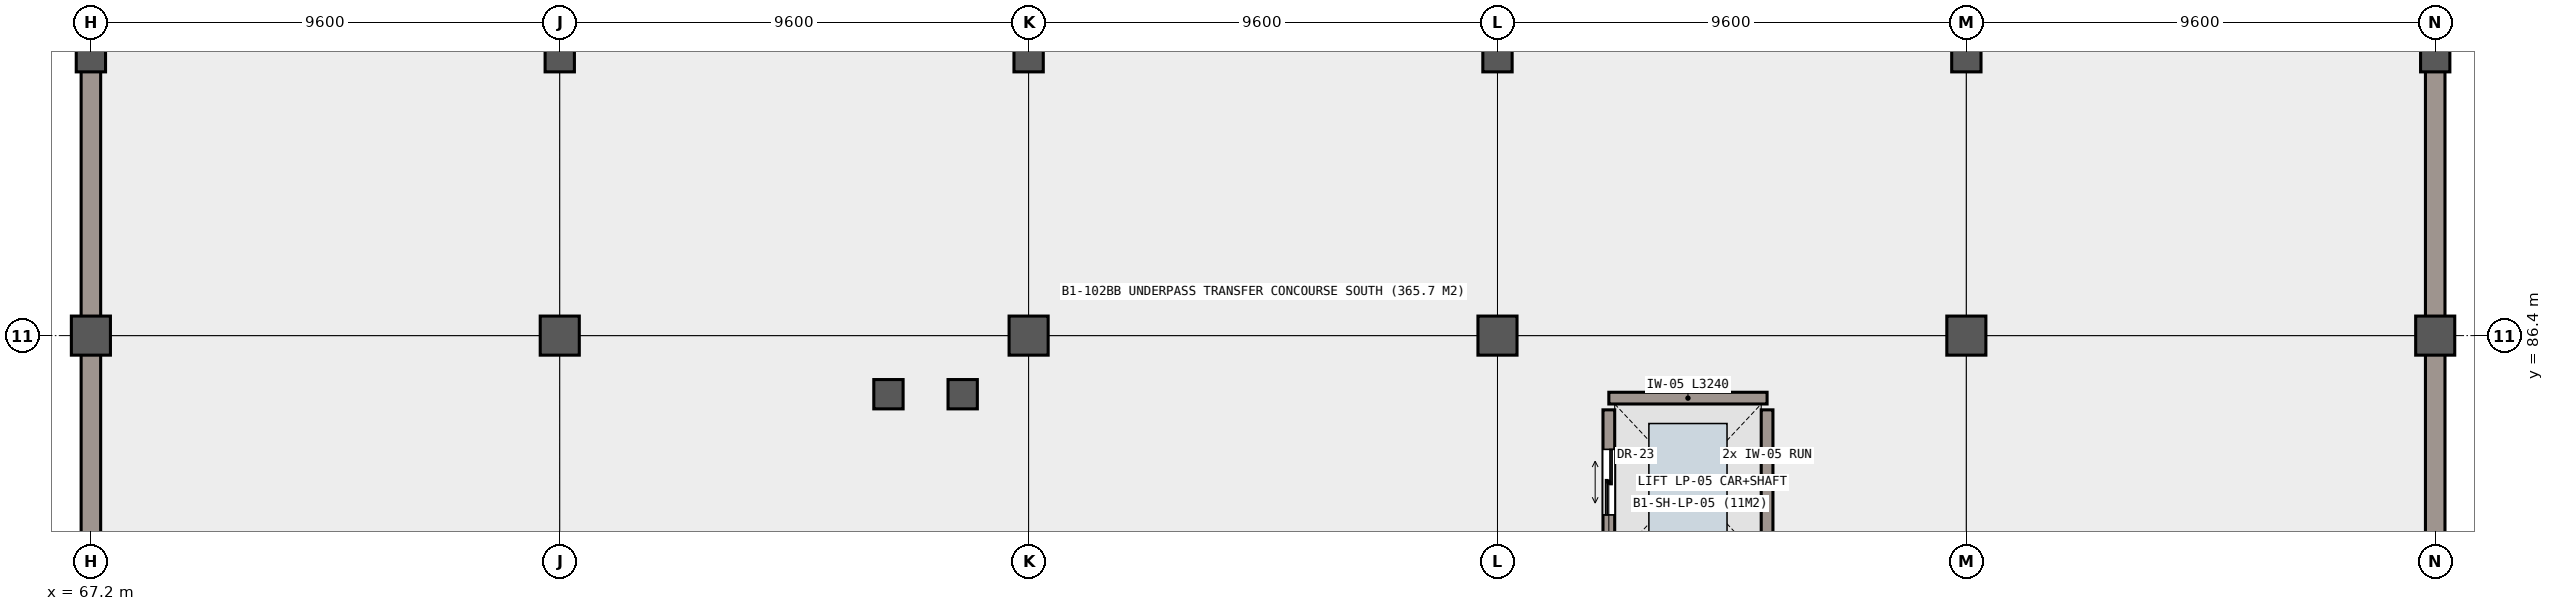
"""IFC4 building model, lengths in metres.
Left out: names, types, materials, properties, quantities, classifications, styles, units other than length and angle.
Written with IfcOpenShell. Run it as: python <this file> out.ifc"""

import sys

from ifc_helpers import new_model, si_unit, direction, frame, frame_2d, origin, origin_2d, place, context, subcontext, project, spatial, rectangle, extrude, element, fill, save


model = new_model("IFC4")
c1 = context("Model", 3, precision=1e-05, world=origin(), true_north=direction((0.0, 1.0)))
c2 = subcontext(c1, "Body", "Model", "MODEL_VIEW")
j1 = project(units=[si_unit("LENGTHUNIT", "METRE"), si_unit("PLANEANGLEUNIT", "RADIAN")], contexts=[c1])
p1 = place(None, origin())
s1 = spatial("IfcSite", under=j1, at=p1, CompositionType="ELEMENT")
p2 = place(p1, origin())
s2 = spatial("IfcBuilding", under=s1, at=p2, CompositionType="ELEMENT")
p3 = place(p2, frame((0.0, 0.0, -4.8)))
s3 = spatial("IfcBuildingStorey", under=s2, at=p3, CompositionType="ELEMENT", Elevation=-4.8)
for number, where, z_axis, x_axis in (
    (1, (67.2, 86.4, 0.0), (0.0, 0.0, 1.0), (1.0, 0.0, 0.0)),
    (2, (76.8, 86.4, 0.0), (0.0, 0.0, 1.0), (1.0, 0.0, 0.0)),
    (3, (86.4, 86.4, 0.0), (0.0, 0.0, 1.0), (1.0, 0.0, 0.0)),
    (4, (96.0, 86.4, 0.0), (0.0, 0.0, 1.0), (1.0, 0.0, 0.0)),
    (5, (105.6, 86.4, 0.0), (0.0, 0.0, 1.0), (1.0, 0.0, 0.0)),
    (6, (115.2, 86.4, 0.0), (0.0, 0.0, 1.0), (1.0, 0.0, 0.0)),
):
    element("IfcColumn", number, at=place(p3, frame(where, z_axis=z_axis, x_axis=x_axis)), inside=s3, PredefinedType="COLUMN", context=c2, shape_type="SweptSolid", body=[
        extrude(rectangle(XDim=0.8, YDim=0.8, at=origin_2d()), origin(), (0.0, 0.0, 1.0), 4.8),
    ])
for number, where, z_axis, x_axis in (
    (7, (67.2, 92.1, 0.0), (0.0, 0.0, 1.0), (1.0, 0.0, 0.0)),
    (8, (76.8, 92.1, 0.0), (0.0, 0.0, 1.0), (1.0, 0.0, 0.0)),
    (9, (86.4, 92.1, 0.0), (0.0, 0.0, 1.0), (1.0, 0.0, 0.0)),
    (10, (96.0, 92.1, 0.0), (0.0, 0.0, 1.0), (1.0, 0.0, 0.0)),
    (11, (105.6, 92.1, 0.0), (0.0, 0.0, 1.0), (1.0, 0.0, 0.0)),
    (12, (115.2, 92.1, 0.0), (0.0, 0.0, 1.0), (1.0, 0.0, 0.0)),
):
    element("IfcColumn", number, at=place(p3, frame(where, z_axis=z_axis, x_axis=x_axis)), inside=s3, PredefinedType="COLUMN", context=c2, shape_type="SweptSolid", body=[
        extrude(rectangle(XDim=0.6, YDim=0.6, at=origin_2d()), origin(), (0.0, 0.0, 1.0), 4.5),
    ])
for number, where, z_axis, x_axis in (
    (13, (83.53, 85.2, 0.0), (0.0, 0.0, 1.0), (1.0, 0.0, 0.0)),
    (14, (85.05, 85.2, 0.0), (0.0, 0.0, 1.0), (1.0, 0.0, 0.0)),
):
    element("IfcColumn", number, at=place(p3, frame(where, z_axis=z_axis, x_axis=x_axis)), inside=s3, PredefinedType="COLUMN", context=c2, shape_type="SweptSolid", body=[
        extrude(rectangle(XDim=0.6, YDim=0.6, at=origin_2d()), origin(), (0.0, 0.0, 1.0), 4.8),
    ])
for number, where, z_axis, x_axis in (
    (15, (67.2, 67.2, 0.0), (0.0, 0.0, 1.0), (0.0, 1.0, 0.0)),
    (16, (115.2, 124.8, 0.0), (0.0, 0.0, 1.0), (0.0, -1.0, 0.0)),
):
    element("IfcWall", number, at=place(p3, frame(where, z_axis=z_axis, x_axis=x_axis)), inside=s3, PredefinedType="USERDEFINED", context=c2, shape_type="SweptSolid", body=[
        extrude(rectangle(XDim=57.6, YDim=0.4, at=frame_2d((28.8, 0.0))), origin(), (0.0, 0.0, 1.0), 3.88),
    ])
p4 = place(p3, frame((98.28, 85.12, 0.0), z_axis=(0.0, 0.0, 1.0), x_axis=(1.0, 0.0, 0.0)))
e17 = element("IfcWall", 17, at=p4, inside=s3, PredefinedType="SHEAR", context=c2, shape_type="SweptSolid", body=[
    extrude(rectangle(XDim=3.24, YDim=0.24, at=frame_2d((1.62, 0.0))), origin(), (0.0, 0.0, 1.0), 4.48),
])
p5 = place(p3, frame((98.28, 81.92, 0.0), z_axis=(0.0, 0.0, 1.0), x_axis=(0.0, 1.0, 0.0)))
e18 = element("IfcWall", 18, at=p5, inside=s3, PredefinedType="SHEAR", context=c2, shape_type="SweptSolid", body=[
    extrude(rectangle(XDim=2.96, YDim=0.24, at=frame_2d((1.48, 0.0))), origin(), (0.0, 0.0, 1.0), 4.48),
])
p6 = place(p5, frame((0.81, 0.0, 0.0)))
e19 = element("IfcOpeningElement", 19, at=p6, cuts=e18, PredefinedType="OPENING", context=c2, shape_type="SweptSolid", body=[
    extrude(rectangle(XDim=1.34, YDim=2.18, at=frame_2d((0.67, 1.09))), frame((0.0, 0.13, 0.0), z_axis=(0.0, -1.0, 0.0), x_axis=(1.0, 0.0, 0.0)), (0.0, 0.0, 1.0), 0.26),
])
p7 = place(p3, frame((101.52, 84.88, 0.0), z_axis=(0.0, 0.0, 1.0), x_axis=(0.0, -1.0, 0.0)))
e20 = element("IfcWall", 20, at=p7, inside=s3, PredefinedType="SHEAR", context=c2, shape_type="SweptSolid", body=[
    extrude(rectangle(XDim=2.96, YDim=0.24, at=frame_2d((1.48, 0.0))), origin(), (0.0, 0.0, 1.0), 4.48),
])
p8 = place(p6, origin())
e21 = element("IfcDoor", 21, at=p8, inside=s3, OperationType="DOUBLE_DOOR_SLIDING", PredefinedType="DOOR", context=c2, shape_type="SweptSolid", body=[
    extrude(rectangle(XDim=1.34, YDim=2.18, at=frame_2d((0.67, 1.09))), frame((0.0, 0.025, 0.0), z_axis=(0.0, -1.0, 0.0), x_axis=(1.0, 0.0, 0.0)), (0.0, 0.0, 1.0), 0.05),
])
fill(e19, e21)
save(model, sys.argv[1])
